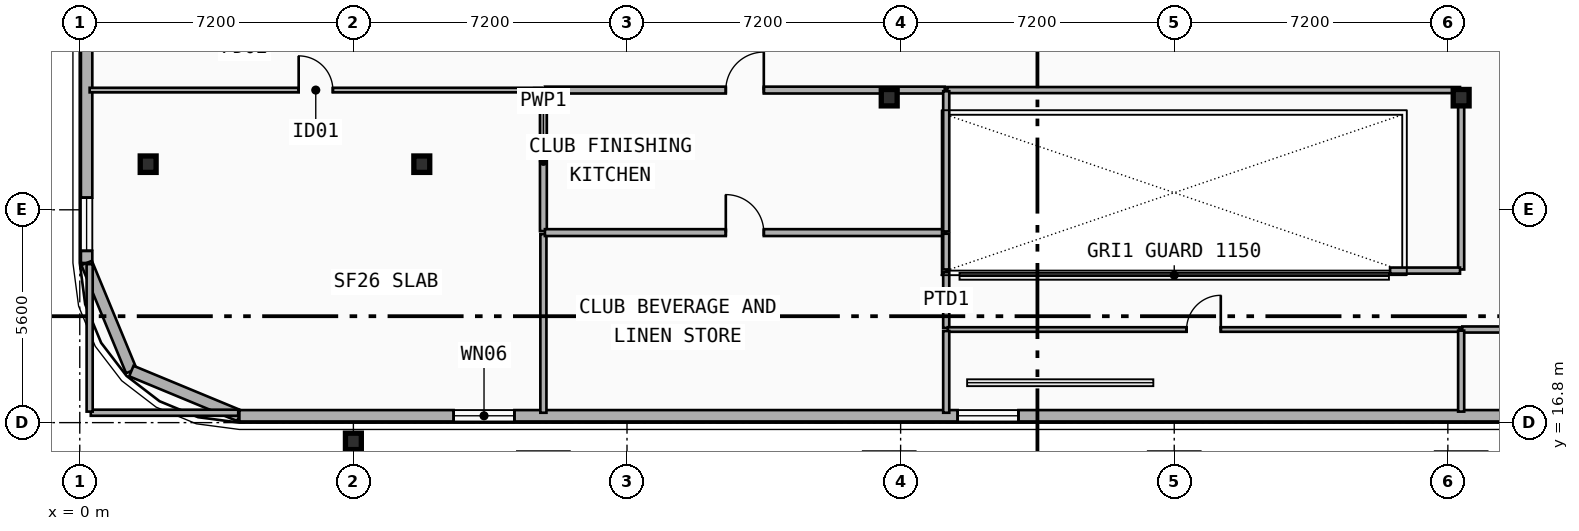
"""IFC4 building model, lengths in metres.
Left out: names, types, materials, properties, quantities, classifications, styles, units other than length and angle.
Written with IfcOpenShell. Run it as: python <this file> out.ifc"""

import sys

from ifc_helpers import new_model, si_unit, direction, frame, frame_2d, origin, origin_2d, place, context, subcontext, project, spatial, rectangle, i_section, extrude, element, fill, save


model = new_model("IFC4")
c1 = context("Model", 3, precision=1e-05, world=origin(), true_north=direction((0.0, 1.0)))
c2 = subcontext(c1, "Body", "Model", "MODEL_VIEW")
j1 = project(units=[si_unit("LENGTHUNIT", "METRE"), si_unit("PLANEANGLEUNIT", "RADIAN")], contexts=[c1])
p1 = place(None, origin())
s1 = spatial("IfcSite", under=j1, at=p1, CompositionType="ELEMENT")
p2 = place(p1, origin())
s2 = spatial("IfcBuilding", under=s1, at=p2, CompositionType="ELEMENT")
p3 = place(p2, frame((0.0, 0.0, 118.8)))
s3 = spatial("IfcBuildingStorey", under=s2, at=p3, CompositionType="ELEMENT", Elevation=118.8)
for number, where, z_axis, x_axis in (
    (1, (12.2, 25.35, 0.0), (0.0, 0.0, 1.0), (1.0, 0.0, 0.0)),
    (2, (21.3, 25.35, 0.0), (0.0, 0.0, 1.0), (1.0, 0.0, 0.0)),
    (3, (36.35, 25.35, 0.0), (0.0, 0.0, 1.0), (1.0, 0.0, 0.0)),
):
    element("IfcColumn", number, at=place(p3, frame(where, z_axis=z_axis, x_axis=x_axis)), inside=s3, PredefinedType="COLUMN", context=c2, shape_type="SweptSolid", body=[
        extrude(i_section(OverallWidth=0.418, OverallDepth=0.432, WebThickness=0.035, FlangeThickness=0.056, FilletRadius=0.015, at=origin_2d()), origin(), (0.0, 0.0, 1.0), 3.5),
    ])
for number, where, z_axis, x_axis in (
    (4, (12.2, 15.462, 0.0), (0.0, -0.09, 0.996), (1.0, 0.0, 0.0)),
    (5, (21.3, 15.462, 0.0), (0.0, -0.09, 0.996), (1.0, 0.0, 0.0)),
    (6, (28.8, 15.462, 0.0), (0.0, -0.09, 0.996), (1.0, 0.0, 0.0)),
    (7, (36.35, 15.462, 0.0), (0.0, -0.09, 0.996), (1.0, 0.0, 0.0)),
):
    element("IfcColumn", number, at=place(p3, frame(where, z_axis=z_axis, x_axis=x_axis)), inside=s3, PredefinedType="COLUMN", context=c2, shape_type="SweptSolid", body=[
        extrude(rectangle(XDim=1.3, YDim=1.3, at=origin_2d()), origin(), (0.0, 0.0, 1.0), 3.514),
    ])
for number, where, z_axis, x_axis in (
    (8, (9.0, 23.6, 0.0), (0.0, 0.0, 1.0), (1.0, 0.0, 0.0)),
    (9, (1.8, 23.6, 0.0), (0.0, 0.0, 1.0), (1.0, 0.0, 0.0)),
):
    element("IfcColumn", number, at=place(p3, frame(where, z_axis=z_axis, x_axis=x_axis)), inside=s3, PredefinedType="COLUMN", context=c2, shape_type="SweptSolid", body=[
        extrude(i_section(OverallWidth=0.418, OverallDepth=0.432, WebThickness=0.035, FlangeThickness=0.056, FilletRadius=0.015, at=origin_2d()), origin(), (0.0, 0.0, 1.0), 3.5),
    ])
p4 = place(p3, frame((7.2, 16.403, 0.0), z_axis=(0.0, -0.079891690793, 0.996803550226), x_axis=(1.0, 0.0, 0.0)))
e10 = element("IfcColumn", 10, at=p4, inside=s3, PredefinedType="COLUMN", context=c2, shape_type="SweptSolid", body=[
    extrude(i_section(OverallWidth=0.418, OverallDepth=0.432, WebThickness=0.035, FlangeThickness=0.056, FilletRadius=0.015, at=origin_2d()), origin(), (0.0, 0.0, 1.0), 3.511),
])
p5 = place(p3, frame((0.18, 21.0, 0.0), z_axis=(0.0, 0.0, 1.0), x_axis=(0.0, 1.0, 0.0)))
e11 = element("IfcWall", 11, at=p5, inside=s3, PredefinedType="SOLIDWALL", context=c2, shape_type="SweptSolid", body=[
    extrude(rectangle(XDim=18.0, YDim=0.3, at=frame_2d((9.0, 0.0))), origin(), (0.0, 0.0, 1.0), 3.24),
])
p6 = place(p5, frame((7.47, 0.0, 0.48)))
e12 = element("IfcOpeningElement", 12, at=p6, cuts=e11, PredefinedType="OPENING", context=c2, shape_type="SweptSolid", body=[
    extrude(rectangle(XDim=1.4, YDim=1.8, at=frame_2d((0.7, 0.9))), frame((0.0, 0.16, 0.0), z_axis=(0.0, -1.0, 0.0), x_axis=(1.0, 0.0, 0.0)), (0.0, 0.0, 1.0), 0.32),
])
p7 = place(p5, frame((12.509, 0.0, 0.48)))
e13 = element("IfcOpeningElement", 13, at=p7, cuts=e11, PredefinedType="OPENING", context=c2, shape_type="SweptSolid", body=[
    extrude(rectangle(XDim=1.4, YDim=1.8, at=frame_2d((0.7, 0.9))), frame((0.0, 0.16, 0.0), z_axis=(0.0, -1.0, 0.0), x_axis=(1.0, 0.0, 0.0)), (0.0, 0.0, 1.0), 0.32),
])
p8 = place(p5, frame((0.32, 0.0, 0.65)))
e14 = element("IfcOpeningElement", 14, at=p8, cuts=e11, PredefinedType="OPENING", context=c2, shape_type="SweptSolid", body=[
    extrude(rectangle(XDim=1.4, YDim=1.8, at=frame_2d((0.7, 0.9))), frame((0.0, 0.16, 0.0), z_axis=(0.0, -1.0, 0.0), x_axis=(1.0, 0.0, 0.0)), (0.0, 0.0, 1.0), 0.32),
])
for number, where, z_axis, x_axis in (
    (15, (1.357, 18.157, 0.0), (0.0, 0.0, 1.0), (-0.383, 0.924, 0.0)),
    (16, (4.2, 16.98, 0.0), (0.0, 0.0, 1.0), (-0.924, 0.383, 0.0)),
):
    element("IfcWall", number, at=place(p3, frame(where, z_axis=z_axis, x_axis=x_axis)), inside=s3, PredefinedType="SOLIDWALL", context=c2, shape_type="SweptSolid", body=[
        extrude(rectangle(XDim=3.077, YDim=0.3, at=frame_2d((1.538, 0.0))), origin(), (0.0, 0.0, 1.0), 3.24),
    ])
p9 = place(p3, frame((53.4, 16.98, 0.0), z_axis=(0.0, 0.0, 1.0), x_axis=(-1.0, 0.0, 0.0)))
e17 = element("IfcWall", 17, at=p9, inside=s3, PredefinedType="SOLIDWALL", context=c2, shape_type="SweptSolid", body=[
    extrude(rectangle(XDim=49.2, YDim=0.3, at=frame_2d((24.6, 0.0))), origin(), (0.0, 0.0, 1.0), 3.24),
])
p10 = place(p9, frame((41.962, 0.0, 0.65)))
e18 = element("IfcOpeningElement", 18, at=p10, cuts=e17, PredefinedType="OPENING", context=c2, shape_type="SweptSolid", body=[
    extrude(rectangle(XDim=1.6, YDim=1.95, at=frame_2d((0.8, 0.975))), frame((0.0, 0.16, 0.0), z_axis=(0.0, -1.0, 0.0), x_axis=(1.0, 0.0, 0.0)), (0.0, 0.0, 1.0), 0.32),
])
p11 = place(p9, frame((28.7, 0.0, 0.65)))
e19 = element("IfcOpeningElement", 19, at=p11, cuts=e17, PredefinedType="OPENING", context=c2, shape_type="SweptSolid", body=[
    extrude(rectangle(XDim=1.6, YDim=1.95, at=frame_2d((0.8, 0.975))), frame((0.0, 0.16, 0.0), z_axis=(0.0, -1.0, 0.0), x_axis=(1.0, 0.0, 0.0)), (0.0, 0.0, 1.0), 0.32),
])
p12 = place(p9, frame((5.1, 0.0, 0.65)))
e20 = element("IfcOpeningElement", 20, at=p12, cuts=e17, PredefinedType="OPENING", context=c2, shape_type="SweptSolid", body=[
    extrude(rectangle(XDim=1.6, YDim=1.95, at=frame_2d((0.8, 0.975))), frame((0.0, 0.16, 0.0), z_axis=(0.0, -1.0, 0.0), x_axis=(1.0, 0.0, 0.0)), (0.0, 0.0, 1.0), 0.32),
])
p13 = place(p9, frame((0.435, 0.0, 0.48)))
e21 = element("IfcOpeningElement", 21, at=p13, cuts=e17, PredefinedType="OPENING", context=c2, shape_type="SweptSolid", body=[
    extrude(rectangle(XDim=1.6, YDim=1.95, at=frame_2d((0.8, 0.975))), frame((0.0, 0.16, 0.0), z_axis=(0.0, -1.0, 0.0), x_axis=(1.0, 0.0, 0.0)), (0.0, 0.0, 1.0), 0.32),
])
p14 = place(p3, frame((0.26, 25.55, 0.0), z_axis=(0.0, 0.0, 1.0), x_axis=(1.0, 0.0, 0.0)))
e22 = element("IfcWall", 22, at=p14, inside=s3, PredefinedType="PARTITIONING", context=c2, shape_type="SweptSolid", body=[
    extrude(rectangle(XDim=11.9, YDim=0.12, at=frame_2d((5.95, 0.0))), origin(), (0.0, 0.0, 1.0), 2.406),
])
p15 = place(p14, frame((5.5, 0.0, 0.0)))
e23 = element("IfcOpeningElement", 23, at=p15, cuts=e22, PredefinedType="OPENING", context=c2, shape_type="SweptSolid", body=[
    extrude(rectangle(XDim=0.9, YDim=2.1, at=frame_2d((0.45, 1.05))), frame((0.0, 0.07, 0.0), z_axis=(0.0, -1.0, 0.0), x_axis=(1.0, 0.0, 0.0)), (0.0, 0.0, 1.0), 0.14),
])
p16 = place(p3, frame((12.24, 25.55, 0.0), z_axis=(0.0, 0.0, 1.0), x_axis=(1.0, 0.0, 0.0)))
e24 = element("IfcWall", 24, at=p16, inside=s3, PredefinedType="PLUMBINGWALL", context=c2, shape_type="SweptSolid", body=[
    extrude(rectangle(XDim=10.52, YDim=0.18, at=frame_2d((5.26, 0.0))), origin(), (0.0, 0.0, 1.0), 2.406),
])
p17 = place(p16, frame((4.76, 0.0, 0.0)))
e25 = element("IfcOpeningElement", 25, at=p17, cuts=e24, PredefinedType="OPENING", context=c2, shape_type="SweptSolid", body=[
    extrude(rectangle(XDim=1.0, YDim=2.15, at=frame_2d((0.5, 1.075))), frame((0.0, 0.1, 0.0), z_axis=(0.0, -1.0, 0.0), x_axis=(1.0, 0.0, 0.0)), (0.0, 0.0, 1.0), 0.2),
])
p18 = place(p3, frame((22.8, 19.29, 0.0), z_axis=(0.0, 0.0, 1.0), x_axis=(0.0, 1.0, 0.0)))
e26 = element("IfcWall", 26, at=p18, inside=s3, PredefinedType="PARTITIONING", context=c2, shape_type="SweptSolid", body=[
    extrude(rectangle(XDim=1.47, YDim=0.16, at=frame_2d((0.735, 0.0))), origin(), (0.0, 0.0, 1.0), 2.68),
])
p19 = place(p3, frame((22.84, 19.25, 0.0), z_axis=(0.0, 0.0, 1.0), x_axis=(1.0, 0.0, 0.0)))
e27 = element("IfcWall", 27, at=p19, inside=s3, PredefinedType="PARTITIONING", context=c2, shape_type="SweptSolid", body=[
    extrude(rectangle(XDim=13.47, YDim=0.12, at=frame_2d((6.735, 0.0))), origin(), (0.0, 0.0, 1.0), 2.406),
])
p20 = place(p19, frame((6.285, 0.0, 0.0)))
e28 = element("IfcOpeningElement", 28, at=p20, cuts=e27, PredefinedType="OPENING", context=c2, shape_type="SweptSolid", body=[
    extrude(rectangle(XDim=0.9, YDim=2.1, at=frame_2d((0.45, 1.05))), frame((0.0, 0.07, 0.0), z_axis=(0.0, -1.0, 0.0), x_axis=(1.0, 0.0, 0.0)), (0.0, 0.0, 1.0), 0.14),
])
p21 = place(p3, frame((12.2, 21.84, 0.0), z_axis=(0.0, 0.0, 1.0), x_axis=(0.0, 1.0, 0.0)))
e29 = element("IfcWall", 29, at=p21, inside=s3, PredefinedType="PLUMBINGWALL", context=c2, shape_type="SweptSolid", body=[
    extrude(rectangle(XDim=3.67, YDim=0.18, at=frame_2d((1.835, 0.0))), origin(), (0.0, 0.0, 1.0), 2.406),
])
p22 = place(p3, frame((12.2, 17.06, 0.0), z_axis=(0.0, 0.0, 1.0), x_axis=(0.0, 1.0, 0.0)))
e30 = element("IfcWall", 30, at=p22, inside=s3, PredefinedType="PARTITIONING", context=c2, shape_type="SweptSolid", body=[
    extrude(rectangle(XDim=4.7, YDim=0.16, at=frame_2d((2.35, 0.0))), origin(), (0.0, 0.0, 1.0), 2.406),
])
p23 = place(p3, frame((12.24, 21.8, 0.0), z_axis=(0.0, 0.0, 1.0), x_axis=(1.0, 0.0, 0.0)))
e31 = element("IfcWall", 31, at=p23, inside=s3, PredefinedType="PLUMBINGWALL", context=c2, shape_type="SweptSolid", body=[
    extrude(rectangle(XDim=10.52, YDim=0.18, at=frame_2d((5.26, 0.0))), origin(), (0.0, 0.0, 1.0), 2.406),
])
p24 = place(p23, frame((4.76, 0.0, 0.0)))
e32 = element("IfcOpeningElement", 32, at=p24, cuts=e31, PredefinedType="OPENING", context=c2, shape_type="SweptSolid", body=[
    extrude(rectangle(XDim=1.0, YDim=2.15, at=frame_2d((0.5, 1.075))), frame((0.0, 0.1, 0.0), z_axis=(0.0, -1.0, 0.0), x_axis=(1.0, 0.0, 0.0)), (0.0, 0.0, 1.0), 0.2),
])
p25 = place(p3, frame((22.8, 17.06, 0.0), z_axis=(0.0, 0.0, 1.0), x_axis=(0.0, 1.0, 0.0)))
e33 = element("IfcWall", 33, at=p25, inside=s3, PredefinedType="PARTITIONING", context=c2, shape_type="SweptSolid", body=[
    extrude(rectangle(XDim=2.15, YDim=0.16, at=frame_2d((1.075, 0.0))), origin(), (0.0, 0.0, 1.0), 2.86),
])
p26 = place(p3, frame((22.83, 25.55, 0.0), z_axis=(0.0, 0.0, 1.0), x_axis=(1.0, 0.0, 0.0)))
e34 = element("IfcWall", 34, at=p26, inside=s3, PredefinedType="PARTITIONING", context=c2, shape_type="SweptSolid", body=[
    extrude(rectangle(XDim=13.49, YDim=0.16, at=frame_2d((6.745, 0.0))), origin(), (0.0, 0.0, 1.0), 2.406),
])
p27 = place(p3, frame((36.38, 19.25, 0.0), z_axis=(0.0, 0.0, 1.0), x_axis=(1.0, 0.0, 0.0)))
e35 = element("IfcWall", 35, at=p27, inside=s3, PredefinedType="PARTITIONING", context=c2, shape_type="SweptSolid", body=[
    extrude(rectangle(XDim=1.94, YDim=0.16, at=frame_2d((0.97, 0.0))), origin(), (0.0, 0.0, 1.0), 2.406),
])
p28 = place(p3, frame((36.35, 20.83, 0.0), z_axis=(0.0, 0.0, 1.0), x_axis=(0.0, 1.0, 0.0)))
e36 = element("IfcWall", 36, at=p28, inside=s3, PredefinedType="PARTITIONING", context=c2, shape_type="SweptSolid", body=[
    extrude(rectangle(XDim=4.69, YDim=0.16, at=frame_2d((2.345, 0.0))), origin(), (0.0, 0.0, 1.0), 2.406),
])
p29 = place(p3, frame((34.48, 20.8, 0.0), z_axis=(0.0, 0.0, 1.0), x_axis=(1.0, 0.0, 0.0)))
e37 = element("IfcWall", 37, at=p29, inside=s3, PredefinedType="PARTITIONING", context=c2, shape_type="SweptSolid", body=[
    extrude(rectangle(XDim=1.84, YDim=0.16, at=frame_2d((0.92, 0.0))), origin(), (0.0, 0.0, 1.0), 2.406),
])
p30 = place(p3, frame((0.29, 17.06, 0.0), z_axis=(0.0, 0.0, 1.0), x_axis=(1.0, 0.0, 0.0)))
e38 = element("IfcWall", 38, at=p30, inside=s3, PredefinedType="PARTITIONING", context=c2, shape_type="SweptSolid", body=[
    extrude(rectangle(XDim=3.88, YDim=0.16, at=frame_2d((1.94, 0.0))), origin(), (0.0, 0.0, 1.0), 2.72),
])
p31 = place(p3, frame((0.26, 17.09, 0.0), z_axis=(0.0, 0.0, 1.0), x_axis=(0.0, 1.0, 0.0)))
e39 = element("IfcWall", 39, at=p31, inside=s3, PredefinedType="PARTITIONING", context=c2, shape_type="SweptSolid", body=[
    extrude(rectangle(XDim=3.88, YDim=0.16, at=frame_2d((1.94, 0.0))), origin(), (0.0, 0.0, 1.0), 3.24),
])
p32 = place(p3, frame((22.8, 21.83, 0.0), z_axis=(0.0, 0.0, 1.0), x_axis=(0.0, 1.0, 0.0)))
e40 = element("IfcWall", 40, at=p32, inside=s3, PredefinedType="PARTITIONING", context=c2, shape_type="SweptSolid", body=[
    extrude(rectangle(XDim=3.69, YDim=0.16, at=frame_2d((1.845, 0.0))), origin(), (0.0, 0.0, 1.0), 3.24),
])
p33 = place(p3, frame((22.8, 20.83, 0.0), z_axis=(0.0, 0.0, 1.0), x_axis=(0.0, 1.0, 0.0)))
e41 = element("IfcWall", 41, at=p33, inside=s3, PredefinedType="PARTITIONING", context=c2, shape_type="SweptSolid", body=[
    extrude(rectangle(XDim=0.94, YDim=0.16, at=frame_2d((0.47, 0.0))), origin(), (0.0, 0.0, 1.0), 2.68),
])
p34 = place(p3, frame((36.35, 17.09, 0.0), z_axis=(0.0, 0.0, 1.0), x_axis=(0.0, 1.0, 0.0)))
e42 = element("IfcWall", 42, at=p34, inside=s3, PredefinedType="PARTITIONING", context=c2, shape_type="SweptSolid", body=[
    extrude(rectangle(XDim=2.13, YDim=0.16, at=frame_2d((1.065, 0.0))), origin(), (0.0, 0.0, 1.0), 2.406),
])
p35 = place(p8, origin())
e43 = element("IfcWindow", 43, at=p35, inside=s3, PartitioningType="SINGLE_PANEL", PredefinedType="WINDOW", context=c2, shape_type="SweptSolid", body=[
    extrude(rectangle(XDim=1.4, YDim=1.8, at=frame_2d((0.7, 0.9))), frame((0.0, 0.03, 0.0), z_axis=(0.0, -1.0, 0.0), x_axis=(1.0, 0.0, 0.0)), (0.0, 0.0, 1.0), 0.06),
])
fill(e14, e43)
p36 = place(p10, origin())
e44 = element("IfcWindow", 44, at=p36, inside=s3, PartitioningType="SINGLE_PANEL", PredefinedType="WINDOW", context=c2, shape_type="SweptSolid", body=[
    extrude(rectangle(XDim=1.6, YDim=1.95, at=frame_2d((0.8, 0.975))), frame((0.0, 0.03, 0.0), z_axis=(0.0, -1.0, 0.0), x_axis=(1.0, 0.0, 0.0)), (0.0, 0.0, 1.0), 0.06),
])
fill(e18, e44)
p37 = place(p11, origin())
e45 = element("IfcWindow", 45, at=p37, inside=s3, PartitioningType="SINGLE_PANEL", PredefinedType="WINDOW", context=c2, shape_type="SweptSolid", body=[
    extrude(rectangle(XDim=1.6, YDim=1.95, at=frame_2d((0.8, 0.975))), frame((0.0, 0.03, 0.0), z_axis=(0.0, -1.0, 0.0), x_axis=(1.0, 0.0, 0.0)), (0.0, 0.0, 1.0), 0.06),
])
fill(e19, e45)
p38 = place(p15, origin())
e46 = element("IfcDoor", 46, at=p38, inside=s3, OperationType="SINGLE_SWING_LEFT", PredefinedType="DOOR", context=c2, shape_type="SweptSolid", body=[
    extrude(rectangle(XDim=0.9, YDim=2.1, at=frame_2d((0.45, 1.05))), frame((0.0, 0.025, 0.0), z_axis=(0.0, -1.0, 0.0), x_axis=(1.0, 0.0, 0.0)), (0.0, 0.0, 1.0), 0.05),
])
fill(e23, e46)
p39 = place(p17, origin())
e47 = element("IfcDoor", 47, at=p39, inside=s3, OperationType="SINGLE_SWING_RIGHT", PredefinedType="DOOR", context=c2, shape_type="SweptSolid", body=[
    extrude(rectangle(XDim=1.0, YDim=2.15, at=frame_2d((0.5, 1.075))), frame((0.0, 0.025, 0.0), z_axis=(0.0, -1.0, 0.0), x_axis=(1.0, 0.0, 0.0)), (0.0, 0.0, 1.0), 0.05),
])
fill(e25, e47)
p40 = place(p20, origin())
e48 = element("IfcDoor", 48, at=p40, inside=s3, OperationType="SINGLE_SWING_RIGHT", PredefinedType="DOOR", context=c2, shape_type="SweptSolid", body=[
    extrude(rectangle(XDim=0.9, YDim=2.1, at=frame_2d((0.45, 1.05))), frame((0.0, 0.025, 0.0), z_axis=(0.0, -1.0, 0.0), x_axis=(1.0, 0.0, 0.0)), (0.0, 0.0, 1.0), 0.05),
])
fill(e28, e48)
p41 = place(p24, origin())
e49 = element("IfcDoor", 49, at=p41, inside=s3, OperationType="SINGLE_SWING_LEFT", PredefinedType="DOOR", context=c2, shape_type="SweptSolid", body=[
    extrude(rectangle(XDim=1.0, YDim=2.15, at=frame_2d((0.5, 1.075))), frame((0.0, 0.025, 0.0), z_axis=(0.0, -1.0, 0.0), x_axis=(1.0, 0.0, 0.0)), (0.0, 0.0, 1.0), 0.05),
])
fill(e32, e49)
save(model, sys.argv[1])
